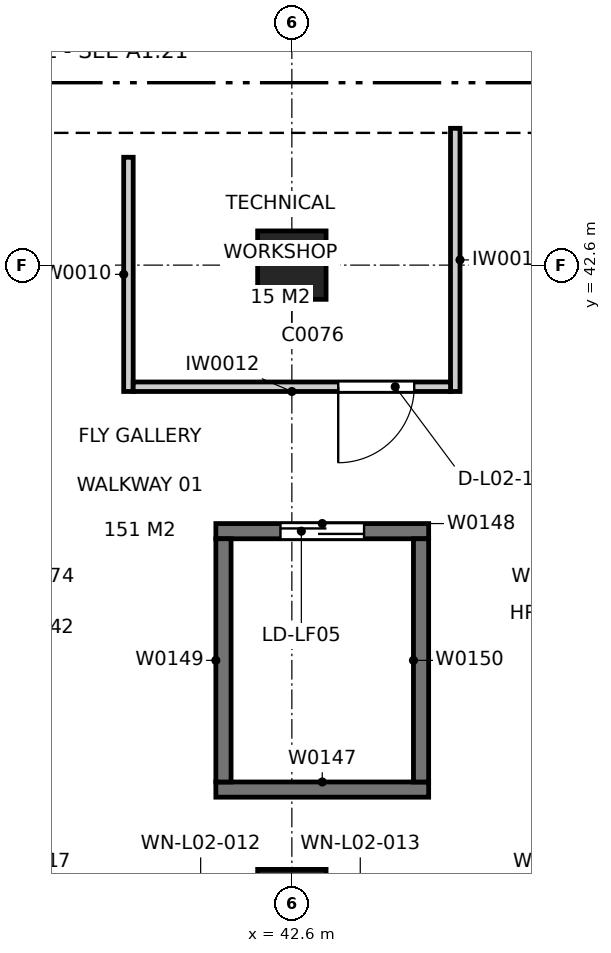
"""IFC4 building model, lengths in metres.
Left out: names, types, materials, properties, quantities, classifications, styles, units other than length and angle.
Written with IfcOpenShell. Run it as: python <this file> out.ifc"""

import sys

from ifc_helpers import new_model, si_unit, direction, frame, frame_2d, origin, origin_2d, place, context, subcontext, project, spatial, rectangle, extrude, element, fill, save


model = new_model("IFC4")
c1 = context("Model", 3, precision=1e-05, world=origin(), true_north=direction((0.0, 1.0)))
c2 = subcontext(c1, "Body", "Model", "MODEL_VIEW")
j1 = project(units=[si_unit("LENGTHUNIT", "METRE"), si_unit("PLANEANGLEUNIT", "RADIAN")], contexts=[c1])
p1 = place(None, origin())
s1 = spatial("IfcSite", under=j1, at=p1, CompositionType="ELEMENT")
p2 = place(p1, origin())
s2 = spatial("IfcBuilding", under=s1, at=p2, CompositionType="ELEMENT")
p3 = place(p2, frame((0.0, 0.0, 9.6)))
s3 = spatial("IfcBuildingStorey", under=s2, at=p3, CompositionType="ELEMENT", Elevation=9.6)
for number, where, z_axis, x_axis in (
    (1, (42.6, 34.2, 0.0), (0.0, 0.0, 1.0), (1.0, 0.0, 0.0)),
    (2, (42.6, 42.6, 0.0), (0.0, 0.0, 1.0), (1.0, 0.0, 0.0)),
):
    element("IfcColumn", number, at=place(p3, frame(where, z_axis=z_axis, x_axis=x_axis)), inside=s3, PredefinedType="COLUMN", context=c2, shape_type="SweptSolid", body=[
        extrude(rectangle(XDim=0.9, YDim=0.9, at=origin_2d()), origin(), (0.0, 0.0, 1.0), 4.8),
    ])
p4 = place(p3, frame((41.6, 35.7, 0.0), z_axis=(0.0, 0.0, 1.0), x_axis=(1.0, 0.0, 0.0)))
e3 = element("IfcWall", 3, at=p4, inside=s3, PredefinedType="SOLIDWALL", context=c2, shape_type="SweptSolid", body=[
    extrude(rectangle(XDim=2.8, YDim=0.2, at=frame_2d((1.4, 0.0))), origin(), (0.0, 0.0, 1.0), 4.8),
])
p5 = place(p3, frame((41.6, 39.1, 0.0), z_axis=(0.0, 0.0, 1.0), x_axis=(1.0, 0.0, 0.0)))
e4 = element("IfcWall", 4, at=p5, inside=s3, PredefinedType="SOLIDWALL", context=c2, shape_type="SweptSolid", body=[
    extrude(rectangle(XDim=2.8, YDim=0.2, at=frame_2d((1.4, 0.0))), origin(), (0.0, 0.0, 1.0), 4.8),
])
p6 = place(p5, frame((0.85, 0.0, 0.0)))
e5 = element("IfcOpeningElement", 5, at=p6, cuts=e4, PredefinedType="OPENING", context=c2, shape_type="SweptSolid", body=[
    extrude(rectangle(XDim=1.1, YDim=2.1, at=frame_2d((0.55, 1.05))), frame((0.0, 0.11, 0.0), z_axis=(0.0, -1.0, 0.0), x_axis=(1.0, 0.0, 0.0)), (0.0, 0.0, 1.0), 0.22),
])
for number, where, z_axis, x_axis in (
    (6, (41.7, 35.8, 0.0), (0.0, 0.0, 1.0), (0.0, 1.0, 0.0)),
    (7, (44.3, 35.8, 0.0), (0.0, 0.0, 1.0), (0.0, 1.0, 0.0)),
):
    element("IfcWall", number, at=place(p3, frame(where, z_axis=z_axis, x_axis=x_axis)), inside=s3, PredefinedType="SOLIDWALL", context=c2, shape_type="SweptSolid", body=[
        extrude(rectangle(XDim=3.2, YDim=0.2, at=frame_2d((1.6, 0.0))), origin(), (0.0, 0.0, 1.0), 4.8),
    ])
p7 = place(p3, frame((40.45, 40.938, 0.0), z_axis=(0.0, 0.0, 1.0), x_axis=(0.0, 1.0, 0.0)))
e8 = element("IfcWall", 8, at=p7, inside=s3, PredefinedType="PARTITIONING", context=c2, shape_type="SweptSolid", body=[
    extrude(rectangle(XDim=3.082, YDim=0.125, at=frame_2d((1.541, 0.0))), origin(), (0.0, 0.0, 1.0), 4.52),
])
p8 = place(p3, frame((44.75, 44.4, 0.0), z_axis=(0.0, 0.0, 1.0), x_axis=(0.0, -1.0, 0.0)))
e9 = element("IfcWall", 9, at=p8, inside=s3, PredefinedType="PARTITIONING", context=c2, shape_type="SweptSolid", body=[
    extrude(rectangle(XDim=3.462, YDim=0.125, at=frame_2d((1.731, 0.0))), origin(), (0.0, 0.0, 1.0), 4.52),
])
p9 = place(p3, frame((44.688, 41.0, 0.0), z_axis=(0.0, 0.0, 1.0), x_axis=(-1.0, 0.0, 0.0)))
e10 = element("IfcWall", 10, at=p9, inside=s3, PredefinedType="PARTITIONING", context=c2, shape_type="SweptSolid", body=[
    extrude(rectangle(XDim=4.175, YDim=0.125, at=frame_2d((2.087, 0.0))), origin(), (0.0, 0.0, 1.0), 4.52),
])
p10 = place(p9, frame((0.478, 0.0, 0.0)))
e11 = element("IfcOpeningElement", 11, at=p10, cuts=e10, PredefinedType="OPENING", context=c2, shape_type="SweptSolid", body=[
    extrude(rectangle(XDim=1.0, YDim=2.1, at=frame_2d((0.5, 1.05))), frame((0.0, 0.073, 0.0), z_axis=(0.0, -1.0, 0.0), x_axis=(1.0, 0.0, 0.0)), (0.0, 0.0, 1.0), 0.145),
])
p11 = place(p10, origin())
e12 = element("IfcDoor", 12, at=p11, inside=s3, OperationType="SINGLE_SWING_RIGHT", PredefinedType="DOOR", context=c2, shape_type="SweptSolid", body=[
    extrude(rectangle(XDim=1.0, YDim=2.1, at=frame_2d((0.5, 1.05))), frame((0.0, 0.025, 0.0), z_axis=(0.0, -1.0, 0.0), x_axis=(1.0, 0.0, 0.0)), (0.0, 0.0, 1.0), 0.05),
])
fill(e11, e12)
p12 = place(p6, origin())
e13 = element("IfcDoor", 13, at=p12, inside=s3, OperationType="SLIDING_TO_LEFT", PredefinedType="DOOR", context=c2, shape_type="SweptSolid", body=[
    extrude(rectangle(XDim=1.1, YDim=2.1, at=frame_2d((0.55, 1.05))), frame((0.0, 0.025, 0.0), z_axis=(0.0, -1.0, 0.0), x_axis=(1.0, 0.0, 0.0)), (0.0, 0.0, 1.0), 0.05),
])
fill(e5, e13)
save(model, sys.argv[1])
